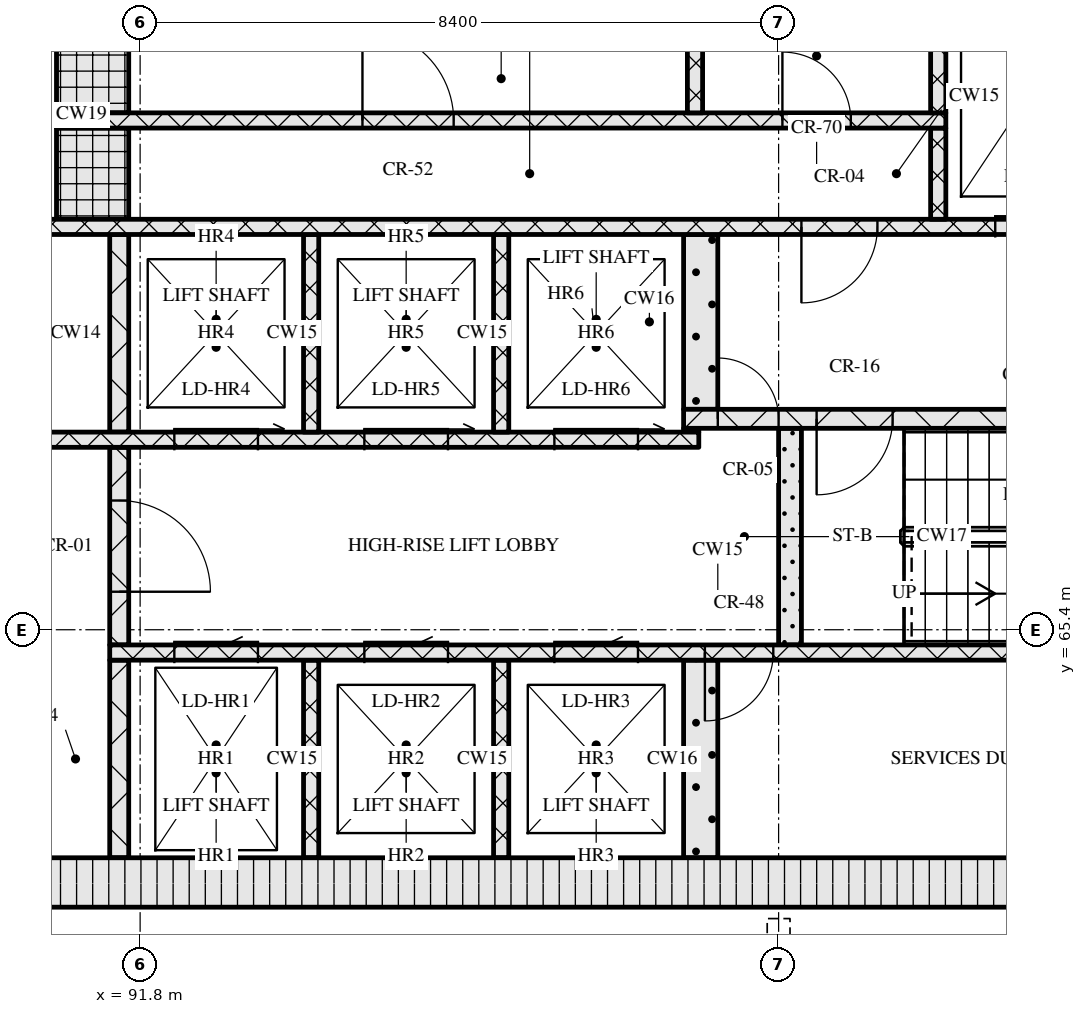
"""IFC4 building model, lengths in metres.
Left out: names, types, materials, properties, quantities, classifications, styles, units other than length and angle.
Written with IfcOpenShell. Run it as: python <this file> out.ifc"""

import sys

from ifc_helpers import new_model, si_unit, direction, frame, frame_2d, origin, place, context, subcontext, project, spatial, rectangle, extrude, element, fill, save


model = new_model("IFC4")
c1 = context("Model", 3, precision=1e-05, world=origin(), true_north=direction((0.0, 1.0)))
c2 = subcontext(c1, "Body", "Model", "MODEL_VIEW")
j1 = project(units=[si_unit("LENGTHUNIT", "METRE"), si_unit("PLANEANGLEUNIT", "RADIAN")], contexts=[c1])
p1 = place(None, origin())
s1 = spatial("IfcSite", under=j1, at=p1, CompositionType="ELEMENT")
p2 = place(p1, origin())
s2 = spatial("IfcBuilding", under=s1, at=p2, CompositionType="ELEMENT")
p3 = place(p2, frame((0.0, 0.0, 194.25)))
s3 = spatial("IfcBuildingStorey", under=s2, at=p3, CompositionType="ELEMENT", Elevation=194.25)
p4 = place(p3, frame((67.15, 62.075, 0.0), z_axis=(0.0, 0.0, 1.0), x_axis=(1.0, 0.0, 0.0)))
e1 = element("IfcWall", 1, at=p4, inside=s3, PredefinedType="SOLIDWALL", context=c2, shape_type="SweptSolid", body=[
    extrude(rectangle(XDim=40.9, YDim=0.65, at=frame_2d((20.45, 0.0))), origin(), (0.0, 0.0, 1.0), 10.97),
])
p5 = place(p4, frame((20.8, 0.0, 0.0)))
e2 = element("IfcOpeningElement", 2, at=p5, cuts=e1, PredefinedType="OPENING", context=c2, shape_type="SweptSolid", body=[
    extrude(rectangle(XDim=1.8, YDim=2.1, at=frame_2d((0.9, 1.05))), frame((0.0, 0.335, 0.0), z_axis=(0.0, -1.0, 0.0), x_axis=(1.0, 0.0, 0.0)), (0.0, 0.0, 1.0), 0.67),
])
p6 = place(p3, frame((91.525, 62.4, 0.0), z_axis=(0.0, 0.0, 1.0), x_axis=(0.0, 1.0, 0.0)))
e3 = element("IfcWall", 3, at=p6, inside=s3, PredefinedType="SOLIDWALL", context=c2, shape_type="SweptSolid", body=[
    extrude(rectangle(XDim=2.6, YDim=0.25, at=frame_2d((1.3, 0.0))), origin(), (0.0, 0.0, 1.0), 10.97),
])
for number, where, z_axis, x_axis in (
    (4, (94.05, 62.4, 0.0), (0.0, 0.0, 1.0), (0.0, 1.0, 0.0)),
    (5, (96.55, 62.4, 0.0), (0.0, 0.0, 1.0), (0.0, 1.0, 0.0)),
):
    element("IfcWall", number, at=place(p3, frame(where, z_axis=z_axis, x_axis=x_axis)), inside=s3, PredefinedType="SOLIDWALL", context=c2, shape_type="SweptSolid", body=[
        extrude(rectangle(XDim=2.6, YDim=0.2, at=frame_2d((1.3, 0.0))), origin(), (0.0, 0.0, 1.0), 10.97),
    ])
p7 = place(p3, frame((99.175, 62.4, 0.0), z_axis=(0.0, 0.0, 1.0), x_axis=(0.0, 1.0, 0.0)))
e6 = element("IfcWall", 6, at=p7, inside=s3, PredefinedType="SOLIDWALL", context=c2, shape_type="SweptSolid", body=[
    extrude(rectangle(XDim=2.6, YDim=0.45, at=frame_2d((1.3, 0.0))), origin(), (0.0, 0.0, 1.0), 10.97),
])
p8 = place(p3, frame((91.4, 65.1, 0.0), z_axis=(0.0, 0.0, 1.0), x_axis=(1.0, 0.0, 0.0)))
e7 = element("IfcWall", 7, at=p8, inside=s3, PredefinedType="SOLIDWALL", context=c2, shape_type="SweptSolid", body=[
    extrude(rectangle(XDim=16.0, YDim=0.2, at=frame_2d((8.0, 0.0))), origin(), (0.0, 0.0, 1.0), 10.97),
])
p9 = place(p8, frame((0.85, 0.0, 0.0)))
e8 = element("IfcOpeningElement", 8, at=p9, cuts=e7, PredefinedType="OPENING", context=c2, shape_type="SweptSolid", body=[
    extrude(rectangle(XDim=1.1, YDim=2.1, at=frame_2d((0.55, 1.05))), frame((0.0, 0.11, 0.0), z_axis=(0.0, -1.0, 0.0), x_axis=(1.0, 0.0, 0.0)), (0.0, 0.0, 1.0), 0.22),
])
p10 = place(p8, frame((3.35, 0.0, 0.0)))
e9 = element("IfcOpeningElement", 9, at=p10, cuts=e7, PredefinedType="OPENING", context=c2, shape_type="SweptSolid", body=[
    extrude(rectangle(XDim=1.1, YDim=2.1, at=frame_2d((0.55, 1.05))), frame((0.0, 0.11, 0.0), z_axis=(0.0, -1.0, 0.0), x_axis=(1.0, 0.0, 0.0)), (0.0, 0.0, 1.0), 0.22),
])
p11 = place(p8, frame((5.85, 0.0, 0.0)))
e10 = element("IfcOpeningElement", 10, at=p11, cuts=e7, PredefinedType="OPENING", context=c2, shape_type="SweptSolid", body=[
    extrude(rectangle(XDim=1.1, YDim=2.1, at=frame_2d((0.55, 1.05))), frame((0.0, 0.11, 0.0), z_axis=(0.0, -1.0, 0.0), x_axis=(1.0, 0.0, 0.0)), (0.0, 0.0, 1.0), 0.22),
])
p12 = place(p8, frame((7.83, 0.0, 0.0)))
e11 = element("IfcOpeningElement", 11, at=p12, cuts=e7, PredefinedType="OPENING", context=c2, shape_type="SweptSolid", body=[
    extrude(rectangle(XDim=0.9, YDim=2.1, at=frame_2d((0.45, 1.05))), frame((0.0, 0.11, 0.0), z_axis=(0.0, -1.0, 0.0), x_axis=(1.0, 0.0, 0.0)), (0.0, 0.0, 1.0), 0.22),
])
p13 = place(p3, frame((91.525, 65.2, 0.0), z_axis=(0.0, 0.0, 1.0), x_axis=(0.0, 1.0, 0.0)))
e12 = element("IfcWall", 12, at=p13, inside=s3, PredefinedType="SOLIDWALL", context=c2, shape_type="SweptSolid", body=[
    extrude(rectangle(XDim=2.6, YDim=0.25, at=frame_2d((1.3, 0.0))), origin(), (0.0, 0.0, 1.0), 10.97),
])
p14 = place(p13, frame((0.7, 0.0, 0.0)))
e13 = element("IfcOpeningElement", 13, at=p14, cuts=e12, PredefinedType="OPENING", context=c2, shape_type="SweptSolid", body=[
    extrude(rectangle(XDim=1.2, YDim=2.1, at=frame_2d((0.6, 1.05))), frame((0.0, 0.135, 0.0), z_axis=(0.0, -1.0, 0.0), x_axis=(1.0, 0.0, 0.0)), (0.0, 0.0, 1.0), 0.27),
])
p15 = place(p3, frame((100.35, 65.2, 0.0), z_axis=(0.0, 0.0, 1.0), x_axis=(0.0, 1.0, 0.0)))
e14 = element("IfcWall", 14, at=p15, inside=s3, PredefinedType="SOLIDWALL", context=c2, shape_type="SweptSolid", body=[
    extrude(rectangle(XDim=2.85, YDim=0.3, at=frame_2d((1.425, 0.0))), origin(), (0.0, 0.0, 1.0), 10.97),
])
p16 = place(p3, frame((76.05, 67.9, 0.0), z_axis=(0.0, 0.0, 1.0), x_axis=(1.0, 0.0, 0.0)))
e15 = element("IfcWall", 15, at=p16, inside=s3, PredefinedType="SOLIDWALL", context=c2, shape_type="SweptSolid", body=[
    extrude(rectangle(XDim=23.1, YDim=0.2, at=frame_2d((11.55, 0.0))), origin(), (0.0, 0.0, 1.0), 10.97),
])
p17 = place(p16, frame((0.75, 0.0, 0.0)))
e16 = element("IfcOpeningElement", 16, at=p17, cuts=e15, PredefinedType="OPENING", context=c2, shape_type="SweptSolid", body=[
    extrude(rectangle(XDim=0.9, YDim=2.1, at=frame_2d((0.45, 1.05))), frame((0.0, 0.11, 0.0), z_axis=(0.0, -1.0, 0.0), x_axis=(1.0, 0.0, 0.0)), (0.0, 0.0, 1.0), 0.22),
])
p18 = place(p16, frame((3.32, 0.0, 0.0)))
e17 = element("IfcOpeningElement", 17, at=p18, cuts=e15, PredefinedType="OPENING", context=c2, shape_type="SweptSolid", body=[
    extrude(rectangle(XDim=0.9, YDim=2.1, at=frame_2d((0.45, 1.05))), frame((0.0, 0.11, 0.0), z_axis=(0.0, -1.0, 0.0), x_axis=(1.0, 0.0, 0.0)), (0.0, 0.0, 1.0), 0.22),
])
p19 = place(p16, frame((5.77, 0.0, 0.0)))
e18 = element("IfcOpeningElement", 18, at=p19, cuts=e15, PredefinedType="OPENING", context=c2, shape_type="SweptSolid", body=[
    extrude(rectangle(XDim=0.9, YDim=2.1, at=frame_2d((0.45, 1.05))), frame((0.0, 0.11, 0.0), z_axis=(0.0, -1.0, 0.0), x_axis=(1.0, 0.0, 0.0)), (0.0, 0.0, 1.0), 0.22),
])
p20 = place(p16, frame((8.45, 0.0, 0.0)))
e19 = element("IfcOpeningElement", 19, at=p20, cuts=e15, PredefinedType="OPENING", context=c2, shape_type="SweptSolid", body=[
    extrude(rectangle(XDim=0.9, YDim=2.1, at=frame_2d((0.45, 1.05))), frame((0.0, 0.11, 0.0), z_axis=(0.0, -1.0, 0.0), x_axis=(1.0, 0.0, 0.0)), (0.0, 0.0, 1.0), 0.22),
])
p21 = place(p16, frame((10.91, 0.0, 0.0)))
e20 = element("IfcOpeningElement", 20, at=p21, cuts=e15, PredefinedType="OPENING", context=c2, shape_type="SweptSolid", body=[
    extrude(rectangle(XDim=0.9, YDim=2.1, at=frame_2d((0.45, 1.05))), frame((0.0, 0.11, 0.0), z_axis=(0.0, -1.0, 0.0), x_axis=(1.0, 0.0, 0.0)), (0.0, 0.0, 1.0), 0.22),
])
p22 = place(p16, frame((13.55, 0.0, 0.0)))
e21 = element("IfcOpeningElement", 21, at=p22, cuts=e15, PredefinedType="OPENING", context=c2, shape_type="SweptSolid", body=[
    extrude(rectangle(XDim=1.0, YDim=2.1, at=frame_2d((0.5, 1.05))), frame((0.0, 0.11, 0.0), z_axis=(0.0, -1.0, 0.0), x_axis=(1.0, 0.0, 0.0)), (0.0, 0.0, 1.0), 0.22),
])
p23 = place(p16, frame((16.2, 0.0, 0.0)))
e22 = element("IfcOpeningElement", 22, at=p23, cuts=e15, PredefinedType="OPENING", context=c2, shape_type="SweptSolid", body=[
    extrude(rectangle(XDim=1.1, YDim=2.1, at=frame_2d((0.55, 1.05))), frame((0.0, 0.11, 0.0), z_axis=(0.0, -1.0, 0.0), x_axis=(1.0, 0.0, 0.0)), (0.0, 0.0, 1.0), 0.22),
])
p24 = place(p16, frame((18.7, 0.0, 0.0)))
e23 = element("IfcOpeningElement", 23, at=p24, cuts=e15, PredefinedType="OPENING", context=c2, shape_type="SweptSolid", body=[
    extrude(rectangle(XDim=1.1, YDim=2.1, at=frame_2d((0.55, 1.05))), frame((0.0, 0.11, 0.0), z_axis=(0.0, -1.0, 0.0), x_axis=(1.0, 0.0, 0.0)), (0.0, 0.0, 1.0), 0.22),
])
p25 = place(p16, frame((21.2, 0.0, 0.0)))
e24 = element("IfcOpeningElement", 24, at=p25, cuts=e15, PredefinedType="OPENING", context=c2, shape_type="SweptSolid", body=[
    extrude(rectangle(XDim=1.1, YDim=2.1, at=frame_2d((0.55, 1.05))), frame((0.0, 0.11, 0.0), z_axis=(0.0, -1.0, 0.0), x_axis=(1.0, 0.0, 0.0)), (0.0, 0.0, 1.0), 0.22),
])
p26 = place(p3, frame((91.525, 68.0, 0.0), z_axis=(0.0, 0.0, 1.0), x_axis=(0.0, 1.0, 0.0)))
e25 = element("IfcWall", 25, at=p26, inside=s3, PredefinedType="SOLIDWALL", context=c2, shape_type="SweptSolid", body=[
    extrude(rectangle(XDim=2.6, YDim=0.25, at=frame_2d((1.3, 0.0))), origin(), (0.0, 0.0, 1.0), 10.97),
])
for number, where, z_axis, x_axis in (
    (26, (94.05, 68.0, 0.0), (0.0, 0.0, 1.0), (0.0, 1.0, 0.0)),
    (27, (96.55, 68.0, 0.0), (0.0, 0.0, 1.0), (0.0, 1.0, 0.0)),
):
    element("IfcWall", number, at=place(p3, frame(where, z_axis=z_axis, x_axis=x_axis)), inside=s3, PredefinedType="SOLIDWALL", context=c2, shape_type="SweptSolid", body=[
        extrude(rectangle(XDim=2.6, YDim=0.2, at=frame_2d((1.3, 0.0))), origin(), (0.0, 0.0, 1.0), 10.97),
    ])
p27 = place(p3, frame((98.95, 68.025, 0.0), z_axis=(0.0, 0.0, 1.0), x_axis=(1.0, 0.0, 0.0)))
e28 = element("IfcWall", 28, at=p27, inside=s3, PredefinedType="SOLIDWALL", context=c2, shape_type="SweptSolid", body=[
    extrude(rectangle(XDim=0.2, YDim=0.05, at=frame_2d((0.1, 0.0))), origin(), (0.0, 0.0, 1.0), 10.97),
])
p28 = place(p3, frame((98.95, 68.175, 0.0), z_axis=(0.0, 0.0, 1.0), x_axis=(1.0, 0.0, 0.0)))
e29 = element("IfcWall", 29, at=p28, inside=s3, PredefinedType="SOLIDWALL", context=c2, shape_type="SweptSolid", body=[
    extrude(rectangle(XDim=8.45, YDim=0.25, at=frame_2d((4.225, 0.0))), origin(), (0.0, 0.0, 1.0), 10.97),
])
p29 = place(p28, frame((0.45, 0.0, 0.0)))
e30 = element("IfcOpeningElement", 30, at=p29, cuts=e29, PredefinedType="OPENING", context=c2, shape_type="SweptSolid", body=[
    extrude(rectangle(XDim=0.8, YDim=2.1, at=frame_2d((0.4, 1.05))), frame((0.0, 0.135, 0.0), z_axis=(0.0, -1.0, 0.0), x_axis=(1.0, 0.0, 0.0)), (0.0, 0.0, 1.0), 0.27),
])
p30 = place(p28, frame((1.75, 0.0, 0.0)))
e31 = element("IfcOpeningElement", 31, at=p30, cuts=e29, PredefinedType="OPENING", context=c2, shape_type="SweptSolid", body=[
    extrude(rectangle(XDim=1.0, YDim=2.1, at=frame_2d((0.5, 1.05))), frame((0.0, 0.135, 0.0), z_axis=(0.0, -1.0, 0.0), x_axis=(1.0, 0.0, 0.0)), (0.0, 0.0, 1.0), 0.27),
])
p31 = place(p3, frame((99.175, 68.3, 0.0), z_axis=(0.0, 0.0, 1.0), x_axis=(0.0, 1.0, 0.0)))
e32 = element("IfcWall", 32, at=p31, inside=s3, PredefinedType="SOLIDWALL", context=c2, shape_type="SweptSolid", body=[
    extrude(rectangle(XDim=2.3, YDim=0.45, at=frame_2d((1.15, 0.0))), origin(), (0.0, 0.0, 1.0), 10.97),
])
p32 = place(p3, frame((67.8, 70.7, 0.0), z_axis=(0.0, 0.0, 1.0), x_axis=(1.0, 0.0, 0.0)))
e33 = element("IfcWall", 33, at=p32, inside=s3, PredefinedType="SOLIDWALL", context=c2, shape_type="SweptSolid", body=[
    extrude(rectangle(XDim=39.6, YDim=0.2, at=frame_2d((19.8, 0.0))), origin(), (0.0, 0.0, 1.0), 10.97),
])
p33 = place(p32, frame((0.65, 0.0, 0.0)))
e34 = element("IfcOpeningElement", 34, at=p33, cuts=e33, PredefinedType="OPENING", context=c2, shape_type="SweptSolid", body=[
    extrude(rectangle(XDim=1.1, YDim=2.1, at=frame_2d((0.55, 1.05))), frame((0.0, 0.11, 0.0), z_axis=(0.0, -1.0, 0.0), x_axis=(1.0, 0.0, 0.0)), (0.0, 0.0, 1.0), 0.22),
])
p34 = place(p32, frame((3.25, 0.0, 0.0)))
e35 = element("IfcOpeningElement", 35, at=p34, cuts=e33, PredefinedType="OPENING", context=c2, shape_type="SweptSolid", body=[
    extrude(rectangle(XDim=1.1, YDim=2.1, at=frame_2d((0.55, 1.05))), frame((0.0, 0.11, 0.0), z_axis=(0.0, -1.0, 0.0), x_axis=(1.0, 0.0, 0.0)), (0.0, 0.0, 1.0), 0.22),
])
p35 = place(p32, frame((5.9, 0.0, 0.0)))
e36 = element("IfcOpeningElement", 36, at=p35, cuts=e33, PredefinedType="OPENING", context=c2, shape_type="SweptSolid", body=[
    extrude(rectangle(XDim=1.0, YDim=2.1, at=frame_2d((0.5, 1.05))), frame((0.0, 0.11, 0.0), z_axis=(0.0, -1.0, 0.0), x_axis=(1.0, 0.0, 0.0)), (0.0, 0.0, 1.0), 0.22),
])
p36 = place(p32, frame((21.7, 0.0, 0.0)))
e37 = element("IfcOpeningElement", 37, at=p36, cuts=e33, PredefinedType="OPENING", context=c2, shape_type="SweptSolid", body=[
    extrude(rectangle(XDim=1.0, YDim=2.1, at=frame_2d((0.5, 1.05))), frame((0.0, 0.11, 0.0), z_axis=(0.0, -1.0, 0.0), x_axis=(1.0, 0.0, 0.0)), (0.0, 0.0, 1.0), 0.22),
])
p37 = place(p32, frame((32.7, 0.0, 0.0)))
e38 = element("IfcOpeningElement", 38, at=p37, cuts=e33, PredefinedType="OPENING", context=c2, shape_type="SweptSolid", body=[
    extrude(rectangle(XDim=1.0, YDim=2.1, at=frame_2d((0.5, 1.05))), frame((0.0, 0.11, 0.0), z_axis=(0.0, -1.0, 0.0), x_axis=(1.0, 0.0, 0.0)), (0.0, 0.0, 1.0), 0.22),
])
p38 = place(p32, frame((35.25, 0.0, 0.0)))
e39 = element("IfcOpeningElement", 39, at=p38, cuts=e33, PredefinedType="OPENING", context=c2, shape_type="SweptSolid", body=[
    extrude(rectangle(XDim=1.1, YDim=2.1, at=frame_2d((0.55, 1.05))), frame((0.0, 0.11, 0.0), z_axis=(0.0, -1.0, 0.0), x_axis=(1.0, 0.0, 0.0)), (0.0, 0.0, 1.0), 0.22),
])
p39 = place(p32, frame((37.85, 0.0, 0.0)))
e40 = element("IfcOpeningElement", 40, at=p39, cuts=e33, PredefinedType="OPENING", context=c2, shape_type="SweptSolid", body=[
    extrude(rectangle(XDim=1.1, YDim=2.1, at=frame_2d((0.55, 1.05))), frame((0.0, 0.11, 0.0), z_axis=(0.0, -1.0, 0.0), x_axis=(1.0, 0.0, 0.0)), (0.0, 0.0, 1.0), 0.22),
])
p40 = place(p3, frame((91.175, 70.8, 0.0), z_axis=(0.0, 0.0, 1.0), x_axis=(0.0, 1.0, 0.0)))
e41 = element("IfcWall", 41, at=p40, inside=s3, PredefinedType="SOLIDWALL", context=c2, shape_type="SweptSolid", body=[
    extrude(rectangle(XDim=1.2, YDim=0.95, at=frame_2d((0.6, 0.0))), origin(), (0.0, 0.0, 1.0), 10.97),
])
p41 = place(p3, frame((102.3, 70.8, 0.0), z_axis=(0.0, 0.0, 1.0), x_axis=(0.0, 1.0, 0.0)))
e42 = element("IfcWall", 42, at=p41, inside=s3, PredefinedType="SOLIDWALL", context=c2, shape_type="SweptSolid", body=[
    extrude(rectangle(XDim=1.2, YDim=0.2, at=frame_2d((0.6, 0.0))), origin(), (0.0, 0.0, 1.0), 10.97),
])
p42 = place(p3, frame((90.7, 72.1, 0.0), z_axis=(0.0, 0.0, 1.0), x_axis=(1.0, 0.0, 0.0)))
e43 = element("IfcWall", 43, at=p42, inside=s3, PredefinedType="SOLIDWALL", context=c2, shape_type="SweptSolid", body=[
    extrude(rectangle(XDim=11.7, YDim=0.2, at=frame_2d((5.85, 0.0))), origin(), (0.0, 0.0, 1.0), 10.97),
])
p43 = place(p42, frame((4.025, 0.0, 0.0)))
e44 = element("IfcOpeningElement", 44, at=p43, cuts=e43, PredefinedType="OPENING", context=c2, shape_type="SweptSolid", body=[
    extrude(rectangle(XDim=1.2, YDim=2.1, at=frame_2d((0.6, 1.05))), frame((0.0, 0.11, 0.0), z_axis=(0.0, -1.0, 0.0), x_axis=(1.0, 0.0, 0.0)), (0.0, 0.0, 1.0), 0.22),
])
p44 = place(p42, frame((9.55, 0.0, 0.0)))
e45 = element("IfcOpeningElement", 45, at=p44, cuts=e43, PredefinedType="OPENING", context=c2, shape_type="SweptSolid", body=[
    extrude(rectangle(XDim=0.9, YDim=2.1, at=frame_2d((0.45, 1.05))), frame((0.0, 0.11, 0.0), z_axis=(0.0, -1.0, 0.0), x_axis=(1.0, 0.0, 0.0)), (0.0, 0.0, 1.0), 0.22),
])
p45 = place(p3, frame((91.175, 72.2, 0.0), z_axis=(0.0, 0.0, 1.0), x_axis=(0.0, 1.0, 0.0)))
e46 = element("IfcWall", 46, at=p45, inside=s3, PredefinedType="SOLIDWALL", context=c2, shape_type="SweptSolid", body=[
    extrude(rectangle(XDim=1.55, YDim=0.95, at=frame_2d((0.775, 0.0))), origin(), (0.0, 0.0, 1.0), 10.97),
])
for number, where, z_axis, x_axis in (
    (47, (99.1, 72.2, 0.0), (0.0, 0.0, 1.0), (0.0, 1.0, 0.0)),
    (48, (102.3, 72.2, 0.0), (0.0, 0.0, 1.0), (0.0, 1.0, 0.0)),
):
    element("IfcWall", number, at=place(p3, frame(where, z_axis=z_axis, x_axis=x_axis)), inside=s3, PredefinedType="SOLIDWALL", context=c2, shape_type="SweptSolid", body=[
        extrude(rectangle(XDim=2.2, YDim=0.2, at=frame_2d((1.1, 0.0))), origin(), (0.0, 0.0, 1.0), 10.97),
    ])
p46 = place(p9, origin())
e49 = element("IfcDoor", 49, at=p46, inside=s3, OperationType="SLIDING_TO_LEFT", PredefinedType="DOOR", context=c2, shape_type="SweptSolid", body=[
    extrude(rectangle(XDim=1.1, YDim=2.1, at=frame_2d((0.55, 1.05))), frame((0.0, 0.025, 0.0), z_axis=(0.0, -1.0, 0.0), x_axis=(1.0, 0.0, 0.0)), (0.0, 0.0, 1.0), 0.05),
])
fill(e8, e49)
p47 = place(p10, origin())
e50 = element("IfcDoor", 50, at=p47, inside=s3, OperationType="SLIDING_TO_LEFT", PredefinedType="DOOR", context=c2, shape_type="SweptSolid", body=[
    extrude(rectangle(XDim=1.1, YDim=2.1, at=frame_2d((0.55, 1.05))), frame((0.0, 0.025, 0.0), z_axis=(0.0, -1.0, 0.0), x_axis=(1.0, 0.0, 0.0)), (0.0, 0.0, 1.0), 0.05),
])
fill(e9, e50)
p48 = place(p11, origin())
e51 = element("IfcDoor", 51, at=p48, inside=s3, OperationType="SLIDING_TO_LEFT", PredefinedType="DOOR", context=c2, shape_type="SweptSolid", body=[
    extrude(rectangle(XDim=1.1, YDim=2.1, at=frame_2d((0.55, 1.05))), frame((0.0, 0.025, 0.0), z_axis=(0.0, -1.0, 0.0), x_axis=(1.0, 0.0, 0.0)), (0.0, 0.0, 1.0), 0.05),
])
fill(e10, e51)
p49 = place(p12, origin())
e52 = element("IfcDoor", 52, at=p49, inside=s3, OperationType="SINGLE_SWING_RIGHT", PredefinedType="DOOR", context=c2, shape_type="SweptSolid", body=[
    extrude(rectangle(XDim=0.9, YDim=2.1, at=frame_2d((0.45, 1.05))), frame((0.0, 0.025, 0.0), z_axis=(0.0, -1.0, 0.0), x_axis=(1.0, 0.0, 0.0)), (0.0, 0.0, 1.0), 0.05),
])
fill(e11, e52)
p50 = place(p14, origin())
e53 = element("IfcDoor", 53, at=p50, inside=s3, OperationType="SINGLE_SWING_RIGHT", PredefinedType="DOOR", context=c2, shape_type="SweptSolid", body=[
    extrude(rectangle(XDim=1.2, YDim=2.1, at=frame_2d((0.6, 1.05))), frame((0.0, 0.025, 0.0), z_axis=(0.0, -1.0, 0.0), x_axis=(1.0, 0.0, 0.0)), (0.0, 0.0, 1.0), 0.05),
])
fill(e13, e53)
p51 = place(p23, origin())
e54 = element("IfcDoor", 54, at=p51, inside=s3, OperationType="SLIDING_TO_RIGHT", PredefinedType="DOOR", context=c2, shape_type="SweptSolid", body=[
    extrude(rectangle(XDim=1.1, YDim=2.1, at=frame_2d((0.55, 1.05))), frame((0.0, 0.025, 0.0), z_axis=(0.0, -1.0, 0.0), x_axis=(1.0, 0.0, 0.0)), (0.0, 0.0, 1.0), 0.05),
])
fill(e22, e54)
p52 = place(p24, origin())
e55 = element("IfcDoor", 55, at=p52, inside=s3, OperationType="SLIDING_TO_RIGHT", PredefinedType="DOOR", context=c2, shape_type="SweptSolid", body=[
    extrude(rectangle(XDim=1.1, YDim=2.1, at=frame_2d((0.55, 1.05))), frame((0.0, 0.025, 0.0), z_axis=(0.0, -1.0, 0.0), x_axis=(1.0, 0.0, 0.0)), (0.0, 0.0, 1.0), 0.05),
])
fill(e23, e55)
p53 = place(p25, origin())
e56 = element("IfcDoor", 56, at=p53, inside=s3, OperationType="SLIDING_TO_RIGHT", PredefinedType="DOOR", context=c2, shape_type="SweptSolid", body=[
    extrude(rectangle(XDim=1.1, YDim=2.1, at=frame_2d((0.55, 1.05))), frame((0.0, 0.025, 0.0), z_axis=(0.0, -1.0, 0.0), x_axis=(1.0, 0.0, 0.0)), (0.0, 0.0, 1.0), 0.05),
])
fill(e24, e56)
p54 = place(p29, origin())
e57 = element("IfcDoor", 57, at=p54, inside=s3, OperationType="SINGLE_SWING_LEFT", PredefinedType="DOOR", context=c2, shape_type="SweptSolid", body=[
    extrude(rectangle(XDim=0.8, YDim=2.1, at=frame_2d((0.4, 1.05))), frame((0.0, 0.025, 0.0), z_axis=(0.0, -1.0, 0.0), x_axis=(1.0, 0.0, 0.0)), (0.0, 0.0, 1.0), 0.05),
])
fill(e30, e57)
p55 = place(p30, origin())
e58 = element("IfcDoor", 58, at=p55, inside=s3, OperationType="SINGLE_SWING_RIGHT", PredefinedType="DOOR", context=c2, shape_type="SweptSolid", body=[
    extrude(rectangle(XDim=1.0, YDim=2.1, at=frame_2d((0.5, 1.05))), frame((0.0, 0.025, 0.0), z_axis=(0.0, -1.0, 0.0), x_axis=(1.0, 0.0, 0.0)), (0.0, 0.0, 1.0), 0.05),
])
fill(e31, e58)
p56 = place(p37, origin())
e59 = element("IfcDoor", 59, at=p56, inside=s3, OperationType="SINGLE_SWING_RIGHT", PredefinedType="DOOR", context=c2, shape_type="SweptSolid", body=[
    extrude(rectangle(XDim=1.0, YDim=2.1, at=frame_2d((0.5, 1.05))), frame((0.0, 0.025, 0.0), z_axis=(0.0, -1.0, 0.0), x_axis=(1.0, 0.0, 0.0)), (0.0, 0.0, 1.0), 0.05),
])
fill(e38, e59)
p57 = place(p38, origin())
e60 = element("IfcDoor", 60, at=p57, inside=s3, OperationType="SLIDING_TO_RIGHT", PredefinedType="DOOR", context=c2, shape_type="SweptSolid", body=[
    extrude(rectangle(XDim=1.1, YDim=2.1, at=frame_2d((0.55, 1.05))), frame((0.0, 0.025, 0.0), z_axis=(0.0, -1.0, 0.0), x_axis=(1.0, 0.0, 0.0)), (0.0, 0.0, 1.0), 0.05),
])
fill(e39, e60)
p58 = place(p43, origin())
e61 = element("IfcDoor", 61, at=p58, inside=s3, OperationType="SINGLE_SWING_LEFT", PredefinedType="DOOR", context=c2, shape_type="SweptSolid", body=[
    extrude(rectangle(XDim=1.2, YDim=2.1, at=frame_2d((0.6, 1.05))), frame((0.0, 0.025, 0.0), z_axis=(0.0, -1.0, 0.0), x_axis=(1.0, 0.0, 0.0)), (0.0, 0.0, 1.0), 0.05),
])
fill(e44, e61)
p59 = place(p44, origin())
e62 = element("IfcDoor", 62, at=p59, inside=s3, OperationType="SINGLE_SWING_LEFT", PredefinedType="DOOR", context=c2, shape_type="SweptSolid", body=[
    extrude(rectangle(XDim=0.9, YDim=2.1, at=frame_2d((0.45, 1.05))), frame((0.0, 0.025, 0.0), z_axis=(0.0, -1.0, 0.0), x_axis=(1.0, 0.0, 0.0)), (0.0, 0.0, 1.0), 0.05),
])
fill(e45, e62)
save(model, sys.argv[1])
